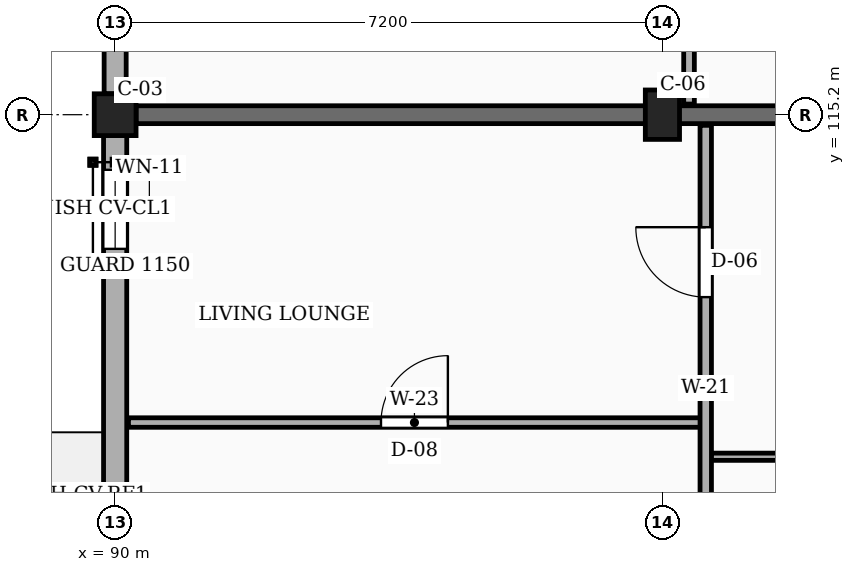
"""IFC4 building model, lengths in metres.
Left out: names, types, materials, properties, quantities, classifications, styles, units other than length and angle.
Written with IfcOpenShell. Run it as: python <this file> out.ifc"""

import sys

from ifc_helpers import new_model, si_unit, direction, frame, frame_2d, origin, origin_2d, place, context, subcontext, project, spatial, rectangle, extrude, element, fill, save


model = new_model("IFC4")
c1 = context("Model", 3, precision=1e-05, world=origin(), true_north=direction((0.0, 1.0)))
c2 = subcontext(c1, "Body", "Model", "MODEL_VIEW")
j1 = project(units=[si_unit("LENGTHUNIT", "METRE"), si_unit("PLANEANGLEUNIT", "RADIAN")], contexts=[c1])
p1 = place(None, origin())
s1 = spatial("IfcSite", under=j1, at=p1, CompositionType="ELEMENT")
p2 = place(p1, origin())
s2 = spatial("IfcBuilding", under=s1, at=p2, CompositionType="ELEMENT")
p3 = place(p2, frame((0.0, 0.0, 20.25)))
s3 = spatial("IfcBuildingStorey", under=s2, at=p3, CompositionType="ELEMENT", Elevation=20.25)
p4 = place(p3, frame((90.0, 115.2, 0.0), z_axis=(0.0, 0.0, 1.0), x_axis=(1.0, 0.0, 0.0)))
e1 = element("IfcColumn", 1, at=p4, inside=s3, PredefinedType="COLUMN", context=c2, shape_type="SweptSolid", body=[
    extrude(rectangle(XDim=0.55, YDim=0.55, at=origin_2d()), origin(), (0.0, 0.0, 1.0), 3.15),
])
p5 = place(p3, frame((97.2, 115.2, 0.0), z_axis=(0.0, 0.0, 1.0), x_axis=(1.0, 0.0, 0.0)))
e2 = element("IfcColumn", 2, at=p5, inside=s3, PredefinedType="COLUMN", context=c2, shape_type="SweptSolid", body=[
    extrude(rectangle(XDim=0.45, YDim=0.65, at=origin_2d()), origin(), (0.0, 0.0, 1.0), 3.15),
])
p6 = place(p3, frame((90.275, 115.2, 0.0), z_axis=(0.0, 0.0, 1.0), x_axis=(1.0, 0.0, 0.0)))
e3 = element("IfcWall", 3, at=p6, inside=s3, PredefinedType="SOLIDWALL", context=c2, shape_type="SweptSolid", body=[
    extrude(rectangle(XDim=12.025, YDim=0.235, at=frame_2d((6.013, 0.0))), origin(), (0.0, 0.0, 1.0), 2.19),
])
p7 = place(p3, frame((90.0, 122.125, 0.0), z_axis=(0.0, 0.0, 1.0), x_axis=(0.0, -1.0, 0.0)))
e4 = element("IfcWall", 4, at=p7, inside=s3, PredefinedType="SOLIDWALL", context=c2, shape_type="SweptSolid", body=[
    extrude(rectangle(XDim=6.65, YDim=0.29, at=frame_2d((3.325, 0.0))), origin(), (0.0, 0.0, 1.0), 2.46),
])
p8 = place(p7, frame((0.45, 0.0, 0.78)))
e5 = element("IfcOpeningElement", 5, at=p8, cuts=e4, PredefinedType="OPENING", context=c2, shape_type="SweptSolid", body=[
    extrude(rectangle(XDim=0.88, YDim=1.26, at=frame_2d((0.44, 0.63))), frame((0.0, 0.155, 0.0), z_axis=(0.0, -1.0, 0.0), x_axis=(1.0, 0.0, 0.0)), (0.0, 0.0, 1.0), 0.31),
])
p9 = place(p7, frame((4.65, 0.0, 0.78)))
e6 = element("IfcOpeningElement", 6, at=p9, cuts=e4, PredefinedType="OPENING", context=c2, shape_type="SweptSolid", body=[
    extrude(rectangle(XDim=1.04, YDim=1.26, at=frame_2d((0.52, 0.63))), frame((0.0, 0.155, 0.0), z_axis=(0.0, -1.0, 0.0), x_axis=(1.0, 0.0, 0.0)), (0.0, 0.0, 1.0), 0.31),
])
p10 = place(p3, frame((90.0, 114.925, 0.0), z_axis=(0.0, 0.0, 1.0), x_axis=(0.0, -1.0, 0.0)))
e7 = element("IfcWall", 7, at=p10, inside=s3, PredefinedType="SOLIDWALL", context=c2, shape_type="SweptSolid", body=[
    extrude(rectangle(XDim=6.65, YDim=0.305, at=frame_2d((3.325, 0.0))), origin(), (0.0, 0.0, 1.0), 2.46),
])
p11 = place(p10, frame((0.45, 0.0, 0.78)))
e8 = element("IfcOpeningElement", 8, at=p11, cuts=e7, PredefinedType="OPENING", context=c2, shape_type="SweptSolid", body=[
    extrude(rectangle(XDim=1.04, YDim=1.26, at=frame_2d((0.52, 0.63))), frame((0.0, 0.163, 0.0), z_axis=(0.0, -1.0, 0.0), x_axis=(1.0, 0.0, 0.0)), (0.0, 0.0, 1.0), 0.325),
])
p12 = place(p10, frame((4.65, 0.0, 0.78)))
e9 = element("IfcOpeningElement", 9, at=p12, cuts=e7, PredefinedType="OPENING", context=c2, shape_type="SweptSolid", body=[
    extrude(rectangle(XDim=1.2, YDim=1.26, at=frame_2d((0.6, 0.63))), frame((0.0, 0.163, 0.0), z_axis=(0.0, -1.0, 0.0), x_axis=(1.0, 0.0, 0.0)), (0.0, 0.0, 1.0), 0.325),
])
p13 = place(p3, frame((90.175, 111.15, 0.0), z_axis=(0.0, 0.0, 1.0), x_axis=(1.0, 0.0, 0.0)))
e10 = element("IfcWall", 10, at=p13, inside=s3, PredefinedType="PARTITIONING", context=c2, shape_type="SweptSolid", body=[
    extrude(rectangle(XDim=7.525, YDim=0.125, at=frame_2d((3.762, 0.0))), origin(), (0.0, 0.0, 1.0), 2.325),
])
p14 = place(p13, frame((3.323, 0.0, 0.0)))
e11 = element("IfcOpeningElement", 11, at=p14, cuts=e10, PredefinedType="OPENING", context=c2, shape_type="SweptSolid", body=[
    extrude(rectangle(XDim=0.88, YDim=2.08, at=frame_2d((0.44, 1.04))), frame((0.0, 0.073, 0.0), z_axis=(0.0, -1.0, 0.0), x_axis=(1.0, 0.0, 0.0)), (0.0, 0.0, 1.0), 0.145),
])
p15 = place(p3, frame((97.84, 110.7, 0.0), z_axis=(0.0, 0.0, 1.0), x_axis=(1.0, 0.0, 0.0)))
e12 = element("IfcWall", 12, at=p15, inside=s3, PredefinedType="PARTITIONING", context=c2, shape_type="SweptSolid", body=[
    extrude(rectangle(XDim=4.37, YDim=0.095, at=frame_2d((2.185, 0.0))), origin(), (0.0, 0.0, 1.0), 2.325),
])
p16 = place(p15, frame((1.75, 0.0, 0.0)))
e13 = element("IfcOpeningElement", 13, at=p16, cuts=e12, PredefinedType="OPENING", context=c2, shape_type="SweptSolid", body=[
    extrude(rectangle(XDim=0.87, YDim=2.05, at=frame_2d((0.435, 1.025))), frame((0.0, 0.058, 0.0), z_axis=(0.0, -1.0, 0.0), x_axis=(1.0, 0.0, 0.0)), (0.0, 0.0, 1.0), 0.115),
])
p17 = place(p3, frame((97.77, 108.14, 0.0), z_axis=(0.0, 0.0, 1.0), x_axis=(0.0, 1.0, 0.0)))
e14 = element("IfcWall", 14, at=p17, inside=s3, PredefinedType="PARTITIONING", context=c2, shape_type="SweptSolid", body=[
    extrude(rectangle(XDim=6.92, YDim=0.15, at=frame_2d((3.46, 0.0))), origin(), (0.0, 0.0, 1.0), 2.325),
])
p18 = place(p17, frame((4.66, 0.0, 0.0)))
e15 = element("IfcOpeningElement", 15, at=p18, cuts=e14, PredefinedType="OPENING", context=c2, shape_type="SweptSolid", body=[
    extrude(rectangle(XDim=0.92, YDim=2.1, at=frame_2d((0.46, 1.05))), frame((0.0, 0.085, 0.0), z_axis=(0.0, -1.0, 0.0), x_axis=(1.0, 0.0, 0.0)), (0.0, 0.0, 1.0), 0.17),
])
p19 = place(p3, frame((97.55, 115.34, 0.0), z_axis=(0.0, 0.0, 1.0), x_axis=(0.0, 1.0, 0.0)))
e16 = element("IfcWall", 16, at=p19, inside=s3, PredefinedType="PARTITIONING", context=c2, shape_type="SweptSolid", body=[
    extrude(rectangle(XDim=6.92, YDim=0.14, at=frame_2d((3.46, 0.0))), origin(), (0.0, 0.0, 1.0), 2.325),
])
p20 = place(p19, frame((4.66, 0.0, 0.0)))
e17 = element("IfcOpeningElement", 17, at=p20, cuts=e16, PredefinedType="OPENING", context=c2, shape_type="SweptSolid", body=[
    extrude(rectangle(XDim=0.95, YDim=2.1, at=frame_2d((0.475, 1.05))), frame((0.0, 0.08, 0.0), z_axis=(0.0, -1.0, 0.0), x_axis=(1.0, 0.0, 0.0)), (0.0, 0.0, 1.0), 0.16),
])
p21 = place(p11, origin())
e18 = element("IfcWindow", 18, at=p21, inside=s3, PartitioningType="SINGLE_PANEL", PredefinedType="WINDOW", context=c2, shape_type="SweptSolid", body=[
    extrude(rectangle(XDim=1.04, YDim=1.26, at=frame_2d((0.52, 0.63))), frame((0.0, 0.03, 0.0), z_axis=(0.0, -1.0, 0.0), x_axis=(1.0, 0.0, 0.0)), (0.0, 0.0, 1.0), 0.06),
])
fill(e8, e18)
p22 = place(p12, origin())
e19 = element("IfcWindow", 19, at=p22, inside=s3, PartitioningType="SINGLE_PANEL", PredefinedType="WINDOW", context=c2, shape_type="SweptSolid", body=[
    extrude(rectangle(XDim=1.2, YDim=1.26, at=frame_2d((0.6, 0.63))), frame((0.0, 0.03, 0.0), z_axis=(0.0, -1.0, 0.0), x_axis=(1.0, 0.0, 0.0)), (0.0, 0.0, 1.0), 0.06),
])
fill(e9, e19)
p23 = place(p14, origin())
e20 = element("IfcDoor", 20, at=p23, inside=s3, OperationType="SINGLE_SWING_RIGHT", PredefinedType="DOOR", context=c2, shape_type="SweptSolid", body=[
    extrude(rectangle(XDim=0.88, YDim=2.08, at=frame_2d((0.44, 1.04))), frame((0.0, 0.025, 0.0), z_axis=(0.0, -1.0, 0.0), x_axis=(1.0, 0.0, 0.0)), (0.0, 0.0, 1.0), 0.05),
])
fill(e11, e20)
p24 = place(p18, origin())
e21 = element("IfcDoor", 21, at=p24, inside=s3, OperationType="SINGLE_SWING_RIGHT", PredefinedType="DOOR", context=c2, shape_type="SweptSolid", body=[
    extrude(rectangle(XDim=0.92, YDim=2.1, at=frame_2d((0.46, 1.05))), frame((0.0, 0.025, 0.0), z_axis=(0.0, -1.0, 0.0), x_axis=(1.0, 0.0, 0.0)), (0.0, 0.0, 1.0), 0.05),
])
fill(e15, e21)
save(model, sys.argv[1])
